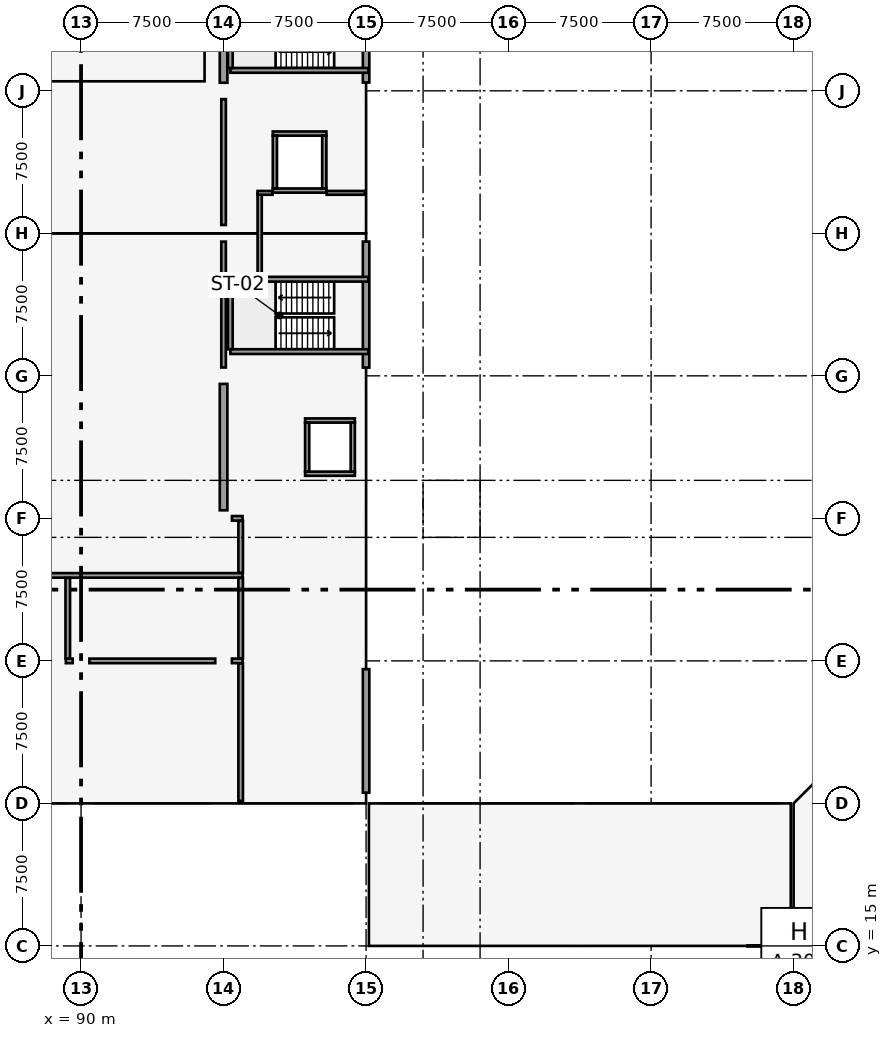
"""IFC4 building model, lengths in metres.
Left out: names, types, materials, properties, quantities, classifications, styles, units other than length and angle.
Written with IfcOpenShell. Run it as: python <this file> out.ifc"""

import sys

from ifc_helpers import new_model, si_unit, direction, frame, frame_2d, origin, origin_2d, place, context, subcontext, project, spatial, rectangle, extrude, element, fill, save


model = new_model("IFC4")
c1 = context("Model", 3, precision=1e-05, world=origin(), true_north=direction((0.0, 1.0)))
c2 = subcontext(c1, "Body", "Model", "MODEL_VIEW")
j1 = project(units=[si_unit("LENGTHUNIT", "METRE"), si_unit("PLANEANGLEUNIT", "RADIAN")], contexts=[c1])
p1 = place(None, origin())
s1 = spatial("IfcSite", under=j1, at=p1, CompositionType="ELEMENT")
p2 = place(p1, origin())
s2 = spatial("IfcBuilding", under=s1, at=p2, CompositionType="ELEMENT")
p3 = place(p2, frame((0.0, 0.0, 4.8)))
s3 = spatial("IfcBuildingStorey", under=s2, at=p3, CompositionType="ELEMENT", Elevation=4.8)
for number, where, z_axis, x_axis in (
    (1, (90.0, 22.5, 0.0), (0.0, 0.0, 1.0), (1.0, 0.0, 0.0)),
    (2, (90.0, 30.0, 0.0), (0.0, 0.0, 1.0), (1.0, 0.0, 0.0)),
    (3, (97.5, 22.5, 0.0), (0.0, 0.0, 1.0), (1.0, 0.0, 0.0)),
    (4, (97.5, 30.0, 0.0), (0.0, 0.0, 1.0), (1.0, 0.0, 0.0)),
    (5, (97.5, 37.5, 0.0), (0.0, 0.0, 1.0), (1.0, 0.0, 0.0)),
    (6, (97.5, 45.0, 0.0), (0.0, 0.0, 1.0), (1.0, 0.0, 0.0)),
    (7, (97.5, 52.5, 0.0), (0.0, 0.0, 1.0), (1.0, 0.0, 0.0)),
    (8, (97.5, 60.0, 0.0), (0.0, 0.0, 1.0), (1.0, 0.0, 0.0)),
):
    element("IfcColumn", number, at=place(p3, frame(where, z_axis=z_axis, x_axis=x_axis)), inside=s3, PredefinedType="COLUMN", context=c2, shape_type="SweptSolid", body=[
        extrude(rectangle(XDim=0.85, YDim=0.85, at=origin_2d()), origin(), (0.0, 0.0, 1.0), 4.2),
    ])
p4 = place(p3, frame((105.0, 22.5, 0.0), z_axis=(0.0, 0.0, 1.0), x_axis=(1.0, 0.0, 0.0)))
e9 = element("IfcColumn", 9, at=p4, inside=s3, PredefinedType="COLUMN", context=c2, shape_type="SweptSolid", body=[
    extrude(rectangle(XDim=0.6, YDim=1.1, at=origin_2d()), origin(), (0.0, 0.0, 1.0), 4.2),
])
for number, where, z_axis, x_axis in (
    (10, (105.0, 30.0, 0.0), (0.0, 0.0, 1.0), (1.0, 0.0, 0.0)),
    (11, (105.0, 37.5, 0.0), (0.0, 0.0, 1.0), (1.0, 0.0, 0.0)),
    (12, (105.0, 45.0, 0.0), (0.0, 0.0, 1.0), (1.0, 0.0, 0.0)),
    (13, (105.0, 52.5, 0.0), (0.0, 0.0, 1.0), (1.0, 0.0, 0.0)),
    (14, (105.0, 60.0, 0.0), (0.0, 0.0, 1.0), (1.0, 0.0, 0.0)),
):
    element("IfcColumn", number, at=place(p3, frame(where, z_axis=z_axis, x_axis=x_axis)), inside=s3, PredefinedType="COLUMN", context=c2, shape_type="SweptSolid", body=[
        extrude(rectangle(XDim=0.85, YDim=0.85, at=origin_2d()), origin(), (0.0, 0.0, 1.0), 4.2),
    ])
for number, where, z_axis, x_axis in (
    (15, (127.5, 15.0, 0.0), (0.0, 0.0, 1.0), (1.0, 0.0, 0.0)),
    (16, (127.5, 22.5, 0.0), (0.0, 0.0, 1.0), (1.0, 0.0, 0.0)),
):
    element("IfcColumn", number, at=place(p3, frame(where, z_axis=z_axis, x_axis=x_axis)), inside=s3, PredefinedType="COLUMN", context=c2, shape_type="SweptSolid", body=[
        extrude(rectangle(XDim=0.62, YDim=0.62, at=origin_2d()), origin(), (0.0, 0.0, 1.0), 4.2),
    ])
p5 = place(p3, frame((97.5, 37.925, 0.0), z_axis=(0.0, 0.0, 1.0), x_axis=(0.0, 1.0, 0.0)))
e17 = element("IfcWall", 17, at=p5, inside=s3, PredefinedType="SHEAR", context=c2, shape_type="SweptSolid", body=[
    extrude(rectangle(XDim=6.65, YDim=0.4, at=frame_2d((3.325, 0.0))), origin(), (0.0, 0.0, 1.0), 2.72),
])
p6 = place(p3, frame((97.5, 60.425, 0.0), z_axis=(0.0, 0.0, 1.0), x_axis=(0.0, 1.0, 0.0)))
e18 = element("IfcWall", 18, at=p6, inside=s3, PredefinedType="SHEAR", context=c2, shape_type="SweptSolid", body=[
    extrude(rectangle(XDim=6.65, YDim=0.4, at=frame_2d((3.325, 0.0))), origin(), (0.0, 0.0, 1.0), 2.87),
])
p7 = place(p3, frame((105.0, 23.065, 0.0), z_axis=(0.0, 0.0, 1.0), x_axis=(0.0, 1.0, 0.0)))
e19 = element("IfcWall", 19, at=p7, inside=s3, PredefinedType="SOLIDWALL", context=c2, shape_type="SweptSolid", body=[
    extrude(rectangle(XDim=6.5, YDim=0.34, at=frame_2d((3.25, 0.0))), origin(), (0.0, 0.0, 1.0), 2.69),
])
p8 = place(p3, frame((105.0, 45.435, 0.0), z_axis=(0.0, 0.0, 1.0), x_axis=(0.0, 1.0, 0.0)))
e20 = element("IfcWall", 20, at=p8, inside=s3, PredefinedType="SOLIDWALL", context=c2, shape_type="SweptSolid", body=[
    extrude(rectangle(XDim=6.63, YDim=0.34, at=frame_2d((3.315, 0.0))), origin(), (0.0, 0.0, 1.0), 2.94),
])
p9 = place(p3, frame((105.0, 60.435, 0.0), z_axis=(0.0, 0.0, 1.0), x_axis=(0.0, 1.0, 0.0)))
e21 = element("IfcWall", 21, at=p9, inside=s3, PredefinedType="SOLIDWALL", context=c2, shape_type="SweptSolid", body=[
    extrude(rectangle(XDim=6.63, YDim=0.34, at=frame_2d((3.315, 0.0))), origin(), (0.0, 0.0, 1.0), 2.84),
])
p10 = place(p3, frame((127.5, 14.675, 0.0), z_axis=(0.0, 0.0, 1.0), x_axis=(0.0, -1.0, 0.0)))
e22 = element("IfcWall", 22, at=p10, inside=s3, PredefinedType="SOLIDWALL", context=c2, shape_type="SweptSolid", body=[
    extrude(rectangle(XDim=6.85, YDim=0.32, at=frame_2d((3.425, 0.0))), origin(), (0.0, 0.0, 1.0), 3.09),
])
p11 = place(p10, frame((2.375, 0.0, 0.6)))
e23 = element("IfcOpeningElement", 23, at=p11, cuts=e22, PredefinedType="OPENING", context=c2, shape_type="SweptSolid", body=[
    extrude(rectangle(XDim=2.1, YDim=1.3, at=frame_2d((1.05, 0.65))), frame((0.0, 0.17, 0.0), z_axis=(0.0, -1.0, 0.0), x_axis=(1.0, 0.0, 0.0)), (0.0, 0.0, 1.0), 0.34),
])
p12 = place(p3, frame((97.86, 46.275, 0.0), z_axis=(0.0, 0.0, 1.0), x_axis=(1.0, 0.0, 0.0)))
e24 = element("IfcWall", 24, at=p12, inside=s3, PredefinedType="SOLIDWALL", context=c2, shape_type="SweptSolid", body=[
    extrude(rectangle(XDim=7.26, YDim=0.25, at=frame_2d((3.63, 0.0))), origin(), (0.0, 0.0, 1.0), 3.92),
])
p13 = place(p12, frame((5.54, 0.0, 0.0)))
e25 = element("IfcOpeningElement", 25, at=p13, cuts=e24, PredefinedType="OPENING", context=c2, shape_type="SweptSolid", body=[
    extrude(rectangle(XDim=1.1, YDim=2.15, at=frame_2d((0.55, 1.075))), frame((0.0, 0.135, 0.0), z_axis=(0.0, -1.0, 0.0), x_axis=(1.0, 0.0, 0.0)), (0.0, 0.0, 1.0), 0.27),
])
p14 = place(p3, frame((97.86, 50.085, 0.0), z_axis=(0.0, 0.0, 1.0), x_axis=(1.0, 0.0, 0.0)))
e26 = element("IfcWall", 26, at=p14, inside=s3, PredefinedType="SOLIDWALL", context=c2, shape_type="SweptSolid", body=[
    extrude(rectangle(XDim=7.26, YDim=0.25, at=frame_2d((3.63, 0.0))), origin(), (0.0, 0.0, 1.0), 3.92),
])
p15 = place(p14, frame((5.54, 0.0, 0.0)))
e27 = element("IfcOpeningElement", 27, at=p15, cuts=e26, PredefinedType="OPENING", context=c2, shape_type="SweptSolid", body=[
    extrude(rectangle(XDim=1.1, YDim=2.15, at=frame_2d((0.55, 1.075))), frame((0.0, 0.135, 0.0), z_axis=(0.0, -1.0, 0.0), x_axis=(1.0, 0.0, 0.0)), (0.0, 0.0, 1.0), 0.27),
])
p16 = place(p3, frame((97.855, 46.4, 0.0), z_axis=(0.0, 0.0, 1.0), x_axis=(0.0, 1.0, 0.0)))
e28 = element("IfcWall", 28, at=p16, inside=s3, PredefinedType="SOLIDWALL", context=c2, shape_type="SweptSolid", body=[
    extrude(rectangle(XDim=3.56, YDim=0.25, at=frame_2d((1.78, 0.0))), origin(), (0.0, 0.0, 1.0), 3.92),
])
p17 = place(p3, frame((97.86, 61.075, 0.0), z_axis=(0.0, 0.0, 1.0), x_axis=(1.0, 0.0, 0.0)))
e29 = element("IfcWall", 29, at=p17, inside=s3, PredefinedType="SOLIDWALL", context=c2, shape_type="SweptSolid", body=[
    extrude(rectangle(XDim=7.26, YDim=0.25, at=frame_2d((3.63, 0.0))), origin(), (0.0, 0.0, 1.0), 3.92),
])
p18 = place(p17, frame((5.54, 0.0, 0.0)))
e30 = element("IfcOpeningElement", 30, at=p18, cuts=e29, PredefinedType="OPENING", context=c2, shape_type="SweptSolid", body=[
    extrude(rectangle(XDim=1.1, YDim=2.15, at=frame_2d((0.55, 1.075))), frame((0.0, 0.135, 0.0), z_axis=(0.0, -1.0, 0.0), x_axis=(1.0, 0.0, 0.0)), (0.0, 0.0, 1.0), 0.27),
])
p19 = place(p3, frame((97.855, 61.2, 0.0), z_axis=(0.0, 0.0, 1.0), x_axis=(0.0, 1.0, 0.0)))
e31 = element("IfcWall", 31, at=p19, inside=s3, PredefinedType="SOLIDWALL", context=c2, shape_type="SweptSolid", body=[
    extrude(rectangle(XDim=3.56, YDim=0.25, at=frame_2d((1.78, 0.0))), origin(), (0.0, 0.0, 1.0), 3.92),
])
for number, where, z_axis, x_axis in (
    (32, (101.79, 39.85, 0.0), (0.0, 0.0, 1.0), (1.0, 0.0, 0.0)),
    (33, (101.79, 42.65, 0.0), (0.0, 0.0, 1.0), (1.0, 0.0, 0.0)),
):
    element("IfcWall", number, at=place(p3, frame(where, z_axis=z_axis, x_axis=x_axis)), inside=s3, PredefinedType="SOLIDWALL", context=c2, shape_type="SweptSolid", body=[
        extrude(rectangle(XDim=2.62, YDim=0.22, at=frame_2d((1.31, 0.0))), origin(), (0.0, 0.0, 1.0), 3.92),
    ])
p20 = place(p3, frame((101.9, 39.96, 0.0), z_axis=(0.0, 0.0, 1.0), x_axis=(0.0, 1.0, 0.0)))
e34 = element("IfcWall", 34, at=p20, inside=s3, PredefinedType="SOLIDWALL", context=c2, shape_type="SweptSolid", body=[
    extrude(rectangle(XDim=2.58, YDim=0.22, at=frame_2d((1.29, 0.0))), origin(), (0.0, 0.0, 1.0), 3.92),
])
p21 = place(p20, frame((0.79, 0.0, 0.0)))
e35 = element("IfcOpeningElement", 35, at=p21, cuts=e34, PredefinedType="OPENING", context=c2, shape_type="SweptSolid", body=[
    extrude(rectangle(XDim=1.0, YDim=2.15, at=frame_2d((0.5, 1.075))), frame((0.0, 0.12, 0.0), z_axis=(0.0, -1.0, 0.0), x_axis=(1.0, 0.0, 0.0)), (0.0, 0.0, 1.0), 0.24),
])
p22 = place(p3, frame((104.3, 39.96, 0.0), z_axis=(0.0, 0.0, 1.0), x_axis=(0.0, 1.0, 0.0)))
e36 = element("IfcWall", 36, at=p22, inside=s3, PredefinedType="SOLIDWALL", context=c2, shape_type="SweptSolid", body=[
    extrude(rectangle(XDim=2.58, YDim=0.22, at=frame_2d((1.29, 0.0))), origin(), (0.0, 0.0, 1.0), 3.92),
])
p23 = place(p3, frame((100.09, 54.75, 0.0), z_axis=(0.0, 0.0, 1.0), x_axis=(1.0, 0.0, 0.0)))
e37 = element("IfcWall", 37, at=p23, inside=s3, PredefinedType="SOLIDWALL", context=c2, shape_type="SweptSolid", body=[
    extrude(rectangle(XDim=2.82, YDim=0.22, at=frame_2d((1.41, 0.0))), origin(), (0.0, 0.0, 1.0), 3.92),
])
p24 = place(p23, frame((0.86, 0.0, 0.0)))
e38 = element("IfcOpeningElement", 38, at=p24, cuts=e37, PredefinedType="OPENING", context=c2, shape_type="SweptSolid", body=[
    extrude(rectangle(XDim=1.1, YDim=2.15, at=frame_2d((0.55, 1.075))), frame((0.0, 0.12, 0.0), z_axis=(0.0, -1.0, 0.0), x_axis=(1.0, 0.0, 0.0)), (0.0, 0.0, 1.0), 0.24),
])
p25 = place(p3, frame((100.09, 57.75, 0.0), z_axis=(0.0, 0.0, 1.0), x_axis=(1.0, 0.0, 0.0)))
e39 = element("IfcWall", 39, at=p25, inside=s3, PredefinedType="SOLIDWALL", context=c2, shape_type="SweptSolid", body=[
    extrude(rectangle(XDim=2.82, YDim=0.22, at=frame_2d((1.41, 0.0))), origin(), (0.0, 0.0, 1.0), 3.92),
])
for number, where, z_axis, x_axis in (
    (40, (100.2, 54.86, 0.0), (0.0, 0.0, 1.0), (0.0, 1.0, 0.0)),
    (41, (102.8, 54.86, 0.0), (0.0, 0.0, 1.0), (0.0, 1.0, 0.0)),
):
    element("IfcWall", number, at=place(p3, frame(where, z_axis=z_axis, x_axis=x_axis)), inside=s3, PredefinedType="SOLIDWALL", context=c2, shape_type="SweptSolid", body=[
        extrude(rectangle(XDim=2.78, YDim=0.22, at=frame_2d((1.39, 0.0))), origin(), (0.0, 0.0, 1.0), 3.92),
    ])
p26 = place(p3, frame((99.4, 50.22, 0.0), z_axis=(0.0, 0.0, 1.0), x_axis=(0.0, 1.0, 0.0)))
e42 = element("IfcWall", 42, at=p26, inside=s3, PredefinedType="SOLIDWALL", context=c2, shape_type="SweptSolid", body=[
    extrude(rectangle(XDim=4.41, YDim=0.22, at=frame_2d((2.205, 0.0))), origin(), (0.0, 0.0, 1.0), 3.92),
])
p27 = place(p26, frame((0.45, 0.0, 0.0)))
e43 = element("IfcOpeningElement", 43, at=p27, cuts=e42, PredefinedType="OPENING", context=c2, shape_type="SweptSolid", body=[
    extrude(rectangle(XDim=1.1, YDim=2.15, at=frame_2d((0.55, 1.075))), frame((0.0, 0.12, 0.0), z_axis=(0.0, -1.0, 0.0), x_axis=(1.0, 0.0, 0.0)), (0.0, 0.0, 1.0), 0.24),
])
p28 = place(p3, frame((99.29, 54.63, 0.0), z_axis=(0.0, 0.0, 1.0), x_axis=(1.0, 0.0, 0.0)))
e44 = element("IfcWall", 44, at=p28, inside=s3, PredefinedType="PARTITIONING", context=c2, shape_type="SweptSolid", body=[
    extrude(rectangle(XDim=0.785, YDim=0.2, at=frame_2d((0.393, 0.0))), origin(), (0.0, 0.0, 1.0), 3.9),
])
p29 = place(p3, frame((102.925, 54.63, 0.0), z_axis=(0.0, 0.0, 1.0), x_axis=(1.0, 0.0, 0.0)))
e45 = element("IfcWall", 45, at=p29, inside=s3, PredefinedType="PARTITIONING", context=c2, shape_type="SweptSolid", body=[
    extrude(rectangle(XDim=2.015, YDim=0.2, at=frame_2d((1.007, 0.0))), origin(), (0.0, 0.0, 1.0), 3.15),
])
p30 = place(p3, frame((89.2, 30.0, 0.0), z_axis=(0.0, 0.0, 1.0), x_axis=(1.0, 0.0, 0.0)))
e46 = element("IfcWall", 46, at=p30, inside=s3, PredefinedType="PARTITIONING", context=c2, shape_type="SweptSolid", body=[
    extrude(rectangle(XDim=0.361, YDim=0.24, at=frame_2d((0.181, 0.0))), origin(), (0.0, 0.0, 1.0), 3.04),
])
p31 = place(p3, frame((90.439, 30.0, 0.0), z_axis=(0.0, 0.0, 1.0), x_axis=(1.0, 0.0, 0.0)))
e47 = element("IfcWall", 47, at=p31, inside=s3, PredefinedType="PARTITIONING", context=c2, shape_type="SweptSolid", body=[
    extrude(rectangle(XDim=6.622, YDim=0.24, at=frame_2d((3.311, 0.0))), origin(), (0.0, 0.0, 1.0), 2.69),
])
for number, where, z_axis, x_axis in (
    (48, (97.939, 30.0, 0.0), (0.0, 0.0, 1.0), (1.0, 0.0, 0.0)),
    (49, (97.939, 37.5, 0.0), (0.0, 0.0, 1.0), (1.0, 0.0, 0.0)),
):
    element("IfcWall", number, at=place(p3, frame(where, z_axis=z_axis, x_axis=x_axis)), inside=s3, PredefinedType="PARTITIONING", context=c2, shape_type="SweptSolid", body=[
        extrude(rectangle(XDim=0.561, YDim=0.24, at=frame_2d((0.281, 0.0))), origin(), (0.0, 0.0, 1.0), 2.69),
    ])
p32 = place(p3, frame((59.0, 34.5, 0.0), z_axis=(0.0, 0.0, 1.0), x_axis=(1.0, 0.0, 0.0)))
e50 = element("IfcWall", 50, at=p32, inside=s3, PredefinedType="PARTITIONING", context=c2, shape_type="SweptSolid", body=[
    extrude(rectangle(XDim=39.5, YDim=0.24, at=frame_2d((19.75, 0.0))), origin(), (0.0, 0.0, 1.0), 2.69),
])
p33 = place(p32, frame((3.85, 0.0, 0.0)))
e51 = element("IfcOpeningElement", 51, at=p33, cuts=e50, PredefinedType="OPENING", context=c2, shape_type="SweptSolid", body=[
    extrude(rectangle(XDim=1.8, YDim=2.16, at=frame_2d((0.9, 1.08))), frame((0.0, 0.13, 0.0), z_axis=(0.0, -1.0, 0.0), x_axis=(1.0, 0.0, 0.0)), (0.0, 0.0, 1.0), 0.26),
])
p34 = place(p32, frame((33.85, 0.0, 0.0)))
e52 = element("IfcOpeningElement", 52, at=p34, cuts=e50, PredefinedType="OPENING", context=c2, shape_type="SweptSolid", body=[
    extrude(rectangle(XDim=1.8, YDim=2.16, at=frame_2d((0.9, 1.08))), frame((0.0, 0.13, 0.0), z_axis=(0.0, -1.0, 0.0), x_axis=(1.0, 0.0, 0.0)), (0.0, 0.0, 1.0), 0.26),
])
p35 = place(p3, frame((89.3, 30.134, 0.0), z_axis=(0.0, 0.0, 1.0), x_axis=(0.0, 1.0, 0.0)))
e53 = element("IfcWall", 53, at=p35, inside=s3, PredefinedType="PARTITIONING", context=c2, shape_type="SweptSolid", body=[
    extrude(rectangle(XDim=4.232, YDim=0.24, at=frame_2d((2.116, 0.0))), origin(), (0.0, 0.0, 1.0), 3.04),
])
p36 = place(p35, frame((1.366, 0.0, 0.0)))
e54 = element("IfcOpeningElement", 54, at=p36, cuts=e53, PredefinedType="OPENING", context=c2, shape_type="SweptSolid", body=[
    extrude(rectangle(XDim=1.5, YDim=2.16, at=frame_2d((0.75, 1.08))), frame((0.0, 0.13, 0.0), z_axis=(0.0, -1.0, 0.0), x_axis=(1.0, 0.0, 0.0)), (0.0, 0.0, 1.0), 0.26),
])
p37 = place(p3, frame((98.4, 22.632, 0.0), z_axis=(0.0, 0.0, 1.0), x_axis=(0.0, 1.0, 0.0)))
e55 = element("IfcWall", 55, at=p37, inside=s3, PredefinedType="PARTITIONING", context=c2, shape_type="SweptSolid", body=[
    extrude(rectangle(XDim=7.234, YDim=0.24, at=frame_2d((3.617, 0.0))), origin(), (0.0, 0.0, 1.0), 2.84),
])
p38 = place(p37, frame((2.868, 0.0, 0.0)))
e56 = element("IfcOpeningElement", 56, at=p38, cuts=e55, PredefinedType="OPENING", context=c2, shape_type="SweptSolid", body=[
    extrude(rectangle(XDim=1.5, YDim=2.16, at=frame_2d((0.75, 1.08))), frame((0.0, 0.13, 0.0), z_axis=(0.0, -1.0, 0.0), x_axis=(1.0, 0.0, 0.0)), (0.0, 0.0, 1.0), 0.26),
])
p39 = place(p3, frame((98.4, 30.134, 0.0), z_axis=(0.0, 0.0, 1.0), x_axis=(0.0, 1.0, 0.0)))
e57 = element("IfcWall", 57, at=p39, inside=s3, PredefinedType="PARTITIONING", context=c2, shape_type="SweptSolid", body=[
    extrude(rectangle(XDim=4.232, YDim=0.24, at=frame_2d((2.116, 0.0))), origin(), (0.0, 0.0, 1.0), 2.84),
])
p40 = place(p39, frame((1.216, 0.0, 0.0)))
e58 = element("IfcOpeningElement", 58, at=p40, cuts=e57, PredefinedType="OPENING", context=c2, shape_type="SweptSolid", body=[
    extrude(rectangle(XDim=1.8, YDim=2.16, at=frame_2d((0.9, 1.08))), frame((0.0, 0.13, 0.0), z_axis=(0.0, -1.0, 0.0), x_axis=(1.0, 0.0, 0.0)), (0.0, 0.0, 1.0), 0.26),
])
p41 = place(p3, frame((98.4, 34.634, 0.0), z_axis=(0.0, 0.0, 1.0), x_axis=(0.0, 1.0, 0.0)))
e59 = element("IfcWall", 59, at=p41, inside=s3, PredefinedType="PARTITIONING", context=c2, shape_type="SweptSolid", body=[
    extrude(rectangle(XDim=2.732, YDim=0.24, at=frame_2d((1.366, 0.0))), origin(), (0.0, 0.0, 1.0), 3.09),
])
p42 = place(p3, frame((97.5, 45.439, 0.0), z_axis=(0.0, 0.0, 1.0), x_axis=(0.0, 1.0, 0.0)))
e60 = element("IfcWall", 60, at=p42, inside=s3, PredefinedType="PARTITIONING", context=c2, shape_type="SweptSolid", body=[
    extrude(rectangle(XDim=6.622, YDim=0.24, at=frame_2d((3.311, 0.0))), origin(), (0.0, 0.0, 1.0), 2.94),
])
p43 = place(p3, frame((97.5, 52.939, 0.0), z_axis=(0.0, 0.0, 1.0), x_axis=(0.0, 1.0, 0.0)))
e61 = element("IfcWall", 61, at=p43, inside=s3, PredefinedType="PARTITIONING", context=c2, shape_type="SweptSolid", body=[
    extrude(rectangle(XDim=6.622, YDim=0.24, at=frame_2d((3.311, 0.0))), origin(), (0.0, 0.0, 1.0), 2.99),
])
p44 = place(p43, frame((2.411, 0.0, 0.0)))
e62 = element("IfcOpeningElement", 62, at=p44, cuts=e61, PredefinedType="OPENING", context=c2, shape_type="SweptSolid", body=[
    extrude(rectangle(XDim=1.8, YDim=2.16, at=frame_2d((0.9, 1.08))), frame((0.0, 0.13, 0.0), z_axis=(0.0, -1.0, 0.0), x_axis=(1.0, 0.0, 0.0)), (0.0, 0.0, 1.0), 0.26),
])
p45 = place(p13, origin())
e63 = element("IfcDoor", 63, at=p45, inside=s3, OperationType="SINGLE_SWING_LEFT", PredefinedType="DOOR", context=c2, shape_type="SweptSolid", body=[
    extrude(rectangle(XDim=1.1, YDim=2.15, at=frame_2d((0.55, 1.075))), frame((0.0, 0.025, 0.0), z_axis=(0.0, -1.0, 0.0), x_axis=(1.0, 0.0, 0.0)), (0.0, 0.0, 1.0), 0.05),
])
fill(e25, e63)
p46 = place(p15, frame((1.1, 0.0, 0.0), z_axis=(0.0, 0.0, 1.0), x_axis=(-1.0, 0.0, 0.0)))
e64 = element("IfcDoor", 64, at=p46, inside=s3, OperationType="SINGLE_SWING_RIGHT", PredefinedType="DOOR", context=c2, shape_type="SweptSolid", body=[
    extrude(rectangle(XDim=1.1, YDim=2.15, at=frame_2d((0.55, 1.075))), frame((0.0, 0.025, 0.0), z_axis=(0.0, -1.0, 0.0), x_axis=(1.0, 0.0, 0.0)), (0.0, 0.0, 1.0), 0.05),
])
fill(e27, e64)
p47 = place(p18, origin())
e65 = element("IfcDoor", 65, at=p47, inside=s3, OperationType="SINGLE_SWING_LEFT", PredefinedType="DOOR", context=c2, shape_type="SweptSolid", body=[
    extrude(rectangle(XDim=1.1, YDim=2.15, at=frame_2d((0.55, 1.075))), frame((0.0, 0.025, 0.0), z_axis=(0.0, -1.0, 0.0), x_axis=(1.0, 0.0, 0.0)), (0.0, 0.0, 1.0), 0.05),
])
fill(e30, e65)
p48 = place(p21, origin())
e66 = element("IfcDoor", 66, at=p48, inside=s3, OperationType="SLIDING_TO_LEFT", PredefinedType="DOOR", context=c2, shape_type="SweptSolid", body=[
    extrude(rectangle(XDim=1.0, YDim=2.15, at=frame_2d((0.5, 1.075))), frame((0.0, 0.025, 0.0), z_axis=(0.0, -1.0, 0.0), x_axis=(1.0, 0.0, 0.0)), (0.0, 0.0, 1.0), 0.05),
])
fill(e35, e66)
p49 = place(p24, origin())
e67 = element("IfcDoor", 67, at=p49, inside=s3, OperationType="SLIDING_TO_LEFT", PredefinedType="DOOR", context=c2, shape_type="SweptSolid", body=[
    extrude(rectangle(XDim=1.1, YDim=2.15, at=frame_2d((0.55, 1.075))), frame((0.0, 0.025, 0.0), z_axis=(0.0, -1.0, 0.0), x_axis=(1.0, 0.0, 0.0)), (0.0, 0.0, 1.0), 0.05),
])
fill(e38, e67)
p50 = place(p27, origin())
e68 = element("IfcDoor", 68, at=p50, inside=s3, OperationType="SINGLE_SWING_RIGHT", PredefinedType="DOOR", context=c2, shape_type="SweptSolid", body=[
    extrude(rectangle(XDim=1.1, YDim=2.15, at=frame_2d((0.55, 1.075))), frame((0.0, 0.025, 0.0), z_axis=(0.0, -1.0, 0.0), x_axis=(1.0, 0.0, 0.0)), (0.0, 0.0, 1.0), 0.05),
])
fill(e43, e68)
p51 = place(p34, origin())
e69 = element("IfcDoor", 69, at=p51, inside=s3, OperationType="SINGLE_SWING_LEFT", PredefinedType="DOOR", context=c2, shape_type="SweptSolid", body=[
    extrude(rectangle(XDim=1.8, YDim=2.16, at=frame_2d((0.9, 1.08))), frame((0.0, 0.025, 0.0), z_axis=(0.0, -1.0, 0.0), x_axis=(1.0, 0.0, 0.0)), (0.0, 0.0, 1.0), 0.05),
])
fill(e52, e69)
p52 = place(p36, origin())
e70 = element("IfcDoor", 70, at=p52, inside=s3, OperationType="SINGLE_SWING_LEFT", PredefinedType="DOOR", context=c2, shape_type="SweptSolid", body=[
    extrude(rectangle(XDim=1.5, YDim=2.16, at=frame_2d((0.75, 1.08))), frame((0.0, 0.025, 0.0), z_axis=(0.0, -1.0, 0.0), x_axis=(1.0, 0.0, 0.0)), (0.0, 0.0, 1.0), 0.05),
])
fill(e54, e70)
p53 = place(p38, origin())
e71 = element("IfcDoor", 71, at=p53, inside=s3, OperationType="SINGLE_SWING_RIGHT", PredefinedType="DOOR", context=c2, shape_type="SweptSolid", body=[
    extrude(rectangle(XDim=1.5, YDim=2.16, at=frame_2d((0.75, 1.08))), frame((0.0, 0.025, 0.0), z_axis=(0.0, -1.0, 0.0), x_axis=(1.0, 0.0, 0.0)), (0.0, 0.0, 1.0), 0.05),
])
fill(e56, e71)
p54 = place(p40, origin())
e72 = element("IfcDoor", 72, at=p54, inside=s3, OperationType="SINGLE_SWING_LEFT", PredefinedType="DOOR", context=c2, shape_type="SweptSolid", body=[
    extrude(rectangle(XDim=1.8, YDim=2.16, at=frame_2d((0.9, 1.08))), frame((0.0, 0.025, 0.0), z_axis=(0.0, -1.0, 0.0), x_axis=(1.0, 0.0, 0.0)), (0.0, 0.0, 1.0), 0.05),
])
fill(e58, e72)
p55 = place(p44, origin())
e73 = element("IfcDoor", 73, at=p55, inside=s3, OperationType="SINGLE_SWING_LEFT", PredefinedType="DOOR", context=c2, shape_type="SweptSolid", body=[
    extrude(rectangle(XDim=1.8, YDim=2.16, at=frame_2d((0.9, 1.08))), frame((0.0, 0.025, 0.0), z_axis=(0.0, -1.0, 0.0), x_axis=(1.0, 0.0, 0.0)), (0.0, 0.0, 1.0), 0.05),
])
fill(e62, e73)
save(model, sys.argv[1])
